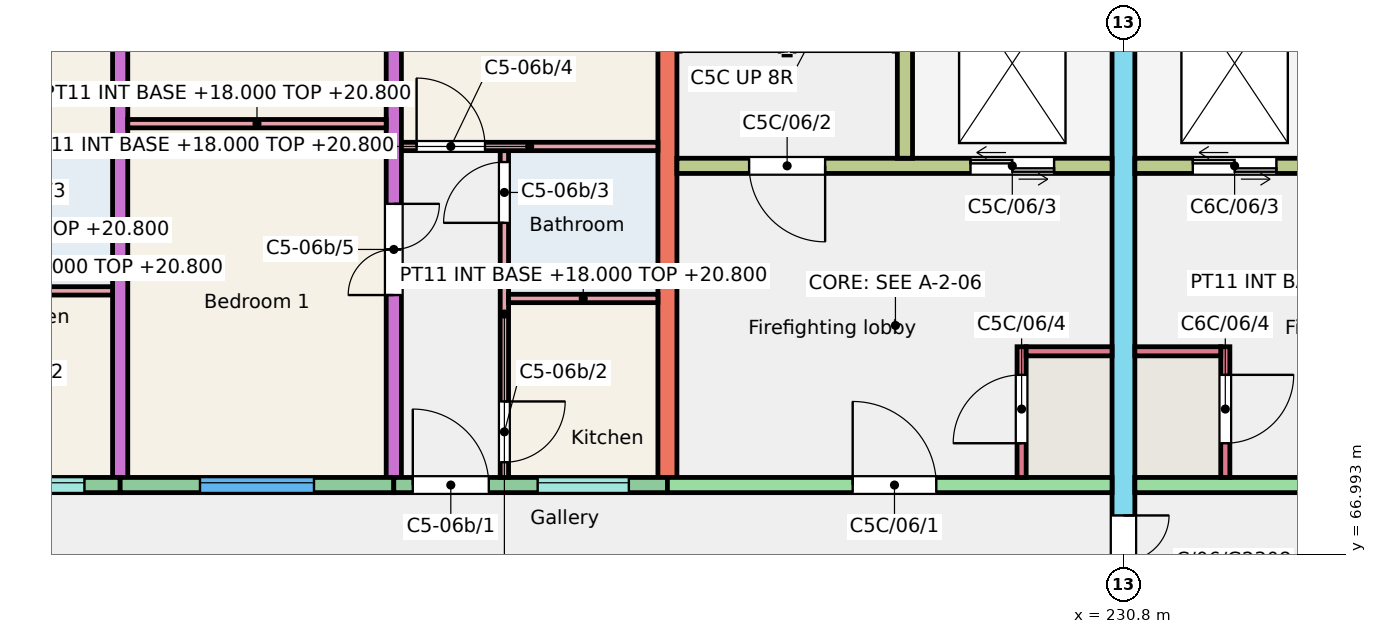
"""IFC4 building model, lengths in metres.
Left out: names, types, materials, properties, quantities, classifications, styles, units other than length and angle.
Written with IfcOpenShell. Run it as: python <this file> out.ifc"""

import sys

from ifc_helpers import new_model, si_unit, direction, frame, frame_2d, origin, place, context, subcontext, project, spatial, rectangle, extrude, element, fill, save


model = new_model("IFC4")
c1 = context("Model", 3, precision=1e-05, world=origin(), true_north=direction((0.0, 1.0)))
c2 = subcontext(c1, "Body", "Model", "MODEL_VIEW")
j1 = project(units=[si_unit("LENGTHUNIT", "METRE"), si_unit("PLANEANGLEUNIT", "RADIAN")], contexts=[c1])
p1 = place(None, origin())
s1 = spatial("IfcSite", under=j1, at=p1, CompositionType="ELEMENT")
p2 = place(p1, origin())
s2 = spatial("IfcBuilding", under=s1, at=p2, CompositionType="ELEMENT")
p3 = place(p2, frame((0.0, 0.0, 18.0)))
s3 = spatial("IfcBuildingStorey", under=s2, at=p3, CompositionType="ELEMENT", Elevation=18.0)
p4 = place(p3, frame((217.6, 68.0, 0.0), z_axis=(0.0, 0.0, 1.0), x_axis=(0.0, 1.0, 0.0)))
e1 = element("IfcWall", 1, at=p4, inside=s3, PredefinedType="SHEAR", context=c2, shape_type="SweptSolid", body=[
    extrude(rectangle(XDim=9.0, YDim=0.2, at=frame_2d((4.5, 0.0))), origin(), (0.0, 0.0, 1.0), 3.0),
])
p5 = place(p3, frame((221.2, 68.0, 0.0), z_axis=(0.0, 0.0, 1.0), x_axis=(0.0, 1.0, 0.0)))
e2 = element("IfcWall", 2, at=p5, inside=s3, PredefinedType="SHEAR", context=c2, shape_type="SweptSolid", body=[
    extrude(rectangle(XDim=9.0, YDim=0.2, at=frame_2d((4.5, 0.0))), origin(), (0.0, 0.0, 1.0), 3.0),
])
p6 = place(p5, frame((2.4, 0.0, 0.0)))
e3 = element("IfcOpeningElement", 3, at=p6, cuts=e2, PredefinedType="OPENING", context=c2, shape_type="SweptSolid", body=[
    extrude(rectangle(XDim=1.2, YDim=2.1, at=frame_2d((0.6, 1.05))), frame((0.0, 0.11, 0.0), z_axis=(0.0, -1.0, 0.0), x_axis=(1.0, 0.0, 0.0)), (0.0, 0.0, 1.0), 0.22),
])
p7 = place(p5, frame((6.4, 0.0, 0.0)))
e4 = element("IfcOpeningElement", 4, at=p7, cuts=e2, PredefinedType="OPENING", context=c2, shape_type="SweptSolid", body=[
    extrude(rectangle(XDim=1.2, YDim=2.1, at=frame_2d((0.6, 1.05))), frame((0.0, 0.11, 0.0), z_axis=(0.0, -1.0, 0.0), x_axis=(1.0, 0.0, 0.0)), (0.0, 0.0, 1.0), 0.22),
])
p8 = place(p3, frame((224.8, 68.0, 0.0), z_axis=(0.0, 0.0, 1.0), x_axis=(0.0, 1.0, 0.0)))
e5 = element("IfcWall", 5, at=p8, inside=s3, PredefinedType="SHEAR", context=c2, shape_type="SweptSolid", body=[
    extrude(rectangle(XDim=9.0, YDim=0.25, at=frame_2d((4.5, 0.0))), origin(), (0.0, 0.0, 1.0), 3.0),
])
p9 = place(p3, frame((230.8, 66.0, 0.0), z_axis=(0.0, 0.0, 1.0), x_axis=(0.0, 1.0, 0.0)))
e6 = element("IfcWall", 6, at=p9, inside=s3, PredefinedType="SHEAR", context=c2, shape_type="SweptSolid", body=[
    extrude(rectangle(XDim=11.0, YDim=0.3, at=frame_2d((5.5, 0.0))), origin(), (0.0, 0.0, 1.0), 3.0),
])
p10 = place(p9, frame((0.3, 0.0, 0.0)))
e7 = element("IfcOpeningElement", 7, at=p10, cuts=e6, PredefinedType="OPENING", context=c2, shape_type="SweptSolid", body=[
    extrude(rectangle(XDim=1.2, YDim=2.1, at=frame_2d((0.6, 1.05))), frame((0.0, 0.16, 0.0), z_axis=(0.0, -1.0, 0.0), x_axis=(1.0, 0.0, 0.0)), (0.0, 0.0, 1.0), 0.32),
])
p11 = place(p3, frame((214.15, 67.9, 0.0), z_axis=(0.0, 0.0, 1.0), x_axis=(1.0, 0.0, 0.0)))
e8 = element("IfcWall", 8, at=p11, inside=s3, PredefinedType="SOLIDWALL", context=c2, shape_type="SweptSolid", body=[
    extrude(rectangle(XDim=3.45, YDim=0.2, at=frame_2d((1.725, 0.0))), origin(), (0.0, 0.0, 1.0), 3.0),
])
p12 = place(p11, frame((1.78, 0.0, 1.1)))
e9 = element("IfcOpeningElement", 9, at=p12, cuts=e8, PredefinedType="OPENING", context=c2, shape_type="SweptSolid", body=[
    extrude(rectangle(XDim=1.2, YDim=1.3, at=frame_2d((0.6, 0.65))), frame((0.0, 0.11, 0.0), z_axis=(0.0, -1.0, 0.0), x_axis=(1.0, 0.0, 0.0)), (0.0, 0.0, 1.0), 0.22),
])
p13 = place(p11, frame((0.15, 0.0, 0.0)))
e10 = element("IfcOpeningElement", 10, at=p13, cuts=e8, PredefinedType="OPENING", context=c2, shape_type="SweptSolid", body=[
    extrude(rectangle(XDim=1.0, YDim=2.1, at=frame_2d((0.5, 1.05))), frame((0.0, 0.11, 0.0), z_axis=(0.0, -1.0, 0.0), x_axis=(1.0, 0.0, 0.0)), (0.0, 0.0, 1.0), 0.22),
])
p14 = place(p3, frame((217.6, 67.9, 0.0), z_axis=(0.0, 0.0, 1.0), x_axis=(1.0, 0.0, 0.0)))
e11 = element("IfcWall", 11, at=p14, inside=s3, PredefinedType="SOLIDWALL", context=c2, shape_type="SweptSolid", body=[
    extrude(rectangle(XDim=3.6, YDim=0.2, at=frame_2d((1.8, 0.0))), origin(), (0.0, 0.0, 1.0), 3.0),
])
p15 = place(p14, frame((1.05, 0.0, 0.9)))
e12 = element("IfcOpeningElement", 12, at=p15, cuts=e11, PredefinedType="OPENING", context=c2, shape_type="SweptSolid", body=[
    extrude(rectangle(XDim=1.5, YDim=1.5, at=frame_2d((0.75, 0.75))), frame((0.0, 0.11, 0.0), z_axis=(0.0, -1.0, 0.0), x_axis=(1.0, 0.0, 0.0)), (0.0, 0.0, 1.0), 0.22),
])
p16 = place(p3, frame((221.2, 67.9, 0.0), z_axis=(0.0, 0.0, 1.0), x_axis=(1.0, 0.0, 0.0)))
e13 = element("IfcWall", 13, at=p16, inside=s3, PredefinedType="SOLIDWALL", context=c2, shape_type="SweptSolid", body=[
    extrude(rectangle(XDim=3.6, YDim=0.2, at=frame_2d((1.8, 0.0))), origin(), (0.0, 0.0, 1.0), 3.0),
])
p17 = place(p16, frame((1.893, 0.0, 1.1)))
e14 = element("IfcOpeningElement", 14, at=p17, cuts=e13, PredefinedType="OPENING", context=c2, shape_type="SweptSolid", body=[
    extrude(rectangle(XDim=1.2, YDim=1.3, at=frame_2d((0.6, 0.65))), frame((0.0, 0.11, 0.0), z_axis=(0.0, -1.0, 0.0), x_axis=(1.0, 0.0, 0.0)), (0.0, 0.0, 1.0), 0.22),
])
p18 = place(p16, frame((0.25, 0.0, 0.0)))
e15 = element("IfcOpeningElement", 15, at=p18, cuts=e13, PredefinedType="OPENING", context=c2, shape_type="SweptSolid", body=[
    extrude(rectangle(XDim=1.0, YDim=2.1, at=frame_2d((0.5, 1.05))), frame((0.0, 0.11, 0.0), z_axis=(0.0, -1.0, 0.0), x_axis=(1.0, 0.0, 0.0)), (0.0, 0.0, 1.0), 0.22),
])
p19 = place(p3, frame((224.8, 67.9, 0.0), z_axis=(0.0, 0.0, 1.0), x_axis=(1.0, 0.0, 0.0)))
e16 = element("IfcWall", 16, at=p19, inside=s3, PredefinedType="SHEAR", context=c2, shape_type="SweptSolid", body=[
    extrude(rectangle(XDim=5.85, YDim=0.2, at=frame_2d((2.925, 0.0))), origin(), (0.0, 0.0, 1.0), 3.0),
])
p20 = place(p19, frame((2.438, 0.0, 0.0)))
e17 = element("IfcOpeningElement", 17, at=p20, cuts=e16, PredefinedType="OPENING", context=c2, shape_type="SweptSolid", body=[
    extrude(rectangle(XDim=1.1, YDim=2.1, at=frame_2d((0.55, 1.05))), frame((0.0, 0.11, 0.0), z_axis=(0.0, -1.0, 0.0), x_axis=(1.0, 0.0, 0.0)), (0.0, 0.0, 1.0), 0.22),
])
p21 = place(p3, frame((224.925, 72.1, 0.0), z_axis=(0.0, 0.0, 1.0), x_axis=(1.0, 0.0, 0.0)))
e18 = element("IfcWall", 18, at=p21, inside=s3, PredefinedType="SHEAR", context=c2, shape_type="SweptSolid", body=[
    extrude(rectangle(XDim=5.725, YDim=0.2, at=frame_2d((2.862, 0.0))), origin(), (0.0, 0.0, 1.0), 3.0),
])
p22 = place(p21, frame((0.95, 0.0, 0.0)))
e19 = element("IfcOpeningElement", 19, at=p22, cuts=e18, PredefinedType="OPENING", context=c2, shape_type="SweptSolid", body=[
    extrude(rectangle(XDim=1.0, YDim=2.1, at=frame_2d((0.5, 1.05))), frame((0.0, 0.11, 0.0), z_axis=(0.0, -1.0, 0.0), x_axis=(1.0, 0.0, 0.0)), (0.0, 0.0, 1.0), 0.22),
])
p23 = place(p21, frame((3.863, 0.0, 0.0)))
e20 = element("IfcOpeningElement", 20, at=p23, cuts=e18, PredefinedType="OPENING", context=c2, shape_type="SweptSolid", body=[
    extrude(rectangle(XDim=1.1, YDim=2.1, at=frame_2d((0.55, 1.05))), frame((0.0, 0.11, 0.0), z_axis=(0.0, -1.0, 0.0), x_axis=(1.0, 0.0, 0.0)), (0.0, 0.0, 1.0), 0.22),
])
p24 = place(p3, frame((227.925, 72.2, 0.0), z_axis=(0.0, 0.0, 1.0), x_axis=(0.0, 1.0, 0.0)))
e21 = element("IfcWall", 21, at=p24, inside=s3, PredefinedType="SHEAR", context=c2, shape_type="SweptSolid", body=[
    extrude(rectangle(XDim=4.8, YDim=0.2, at=frame_2d((2.4, 0.0))), origin(), (0.0, 0.0, 1.0), 3.0),
])
p25 = place(p3, frame((229.46, 68.0, 0.0), z_axis=(0.0, 0.0, 1.0), x_axis=(0.0, 1.0, 0.0)))
e22 = element("IfcWall", 22, at=p25, inside=s3, PredefinedType="SHEAR", context=c2, shape_type="SweptSolid", body=[
    extrude(rectangle(XDim=1.72, YDim=0.12, at=frame_2d((0.86, 0.0))), origin(), (0.0, 0.0, 1.0), 3.0),
])
p26 = place(p25, frame((0.45, 0.0, 0.0)))
e23 = element("IfcOpeningElement", 23, at=p26, cuts=e22, PredefinedType="OPENING", context=c2, shape_type="SweptSolid", body=[
    extrude(rectangle(XDim=0.9, YDim=2.1, at=frame_2d((0.45, 1.05))), frame((0.0, 0.07, 0.0), z_axis=(0.0, -1.0, 0.0), x_axis=(1.0, 0.0, 0.0)), (0.0, 0.0, 1.0), 0.14),
])
p27 = place(p3, frame((229.52, 69.66, 0.0), z_axis=(0.0, 0.0, 1.0), x_axis=(1.0, 0.0, 0.0)))
e24 = element("IfcWall", 24, at=p27, inside=s3, PredefinedType="SHEAR", context=c2, shape_type="SweptSolid", body=[
    extrude(rectangle(XDim=1.13, YDim=0.12, at=frame_2d((0.565, 0.0))), origin(), (0.0, 0.0, 1.0), 3.0),
])
p28 = place(p3, frame((230.95, 67.9, 0.0), z_axis=(0.0, 0.0, 1.0), x_axis=(1.0, 0.0, 0.0)))
e25 = element("IfcWall", 25, at=p28, inside=s3, PredefinedType="SHEAR", context=c2, shape_type="SweptSolid", body=[
    extrude(rectangle(XDim=5.85, YDim=0.2, at=frame_2d((2.925, 0.0))), origin(), (0.0, 0.0, 1.0), 3.0),
])
p29 = place(p28, frame((2.312, 0.0, 0.0)))
e26 = element("IfcOpeningElement", 26, at=p29, cuts=e25, PredefinedType="OPENING", context=c2, shape_type="SweptSolid", body=[
    extrude(rectangle(XDim=1.1, YDim=2.1, at=frame_2d((0.55, 1.05))), frame((0.0, 0.11, 0.0), z_axis=(0.0, -1.0, 0.0), x_axis=(1.0, 0.0, 0.0)), (0.0, 0.0, 1.0), 0.22),
])
p30 = place(p3, frame((230.95, 72.1, 0.0), z_axis=(0.0, 0.0, 1.0), x_axis=(1.0, 0.0, 0.0)))
e27 = element("IfcWall", 27, at=p30, inside=s3, PredefinedType="SHEAR", context=c2, shape_type="SweptSolid", body=[
    extrude(rectangle(XDim=5.725, YDim=0.2, at=frame_2d((2.863, 0.0))), origin(), (0.0, 0.0, 1.0), 3.0),
])
p31 = place(p30, frame((3.775, 0.0, 0.0)))
e28 = element("IfcOpeningElement", 28, at=p31, cuts=e27, PredefinedType="OPENING", context=c2, shape_type="SweptSolid", body=[
    extrude(rectangle(XDim=1.0, YDim=2.1, at=frame_2d((0.5, 1.05))), frame((0.0, 0.11, 0.0), z_axis=(0.0, -1.0, 0.0), x_axis=(1.0, 0.0, 0.0)), (0.0, 0.0, 1.0), 0.22),
])
p32 = place(p30, frame((0.762, 0.0, 0.0)))
e29 = element("IfcOpeningElement", 29, at=p32, cuts=e27, PredefinedType="OPENING", context=c2, shape_type="SweptSolid", body=[
    extrude(rectangle(XDim=1.1, YDim=2.1, at=frame_2d((0.55, 1.05))), frame((0.0, 0.11, 0.0), z_axis=(0.0, -1.0, 0.0), x_axis=(1.0, 0.0, 0.0)), (0.0, 0.0, 1.0), 0.22),
])
p33 = place(p3, frame((232.14, 68.0, 0.0), z_axis=(0.0, 0.0, 1.0), x_axis=(0.0, 1.0, 0.0)))
e30 = element("IfcWall", 30, at=p33, inside=s3, PredefinedType="SHEAR", context=c2, shape_type="SweptSolid", body=[
    extrude(rectangle(XDim=1.72, YDim=0.12, at=frame_2d((0.86, 0.0))), origin(), (0.0, 0.0, 1.0), 3.0),
])
p34 = place(p33, frame((0.45, 0.0, 0.0)))
e31 = element("IfcOpeningElement", 31, at=p34, cuts=e30, PredefinedType="OPENING", context=c2, shape_type="SweptSolid", body=[
    extrude(rectangle(XDim=0.9, YDim=2.1, at=frame_2d((0.45, 1.05))), frame((0.0, 0.07, 0.0), z_axis=(0.0, -1.0, 0.0), x_axis=(1.0, 0.0, 0.0)), (0.0, 0.0, 1.0), 0.14),
])
p35 = place(p3, frame((230.95, 69.66, 0.0), z_axis=(0.0, 0.0, 1.0), x_axis=(1.0, 0.0, 0.0)))
e32 = element("IfcWall", 32, at=p35, inside=s3, PredefinedType="SHEAR", context=c2, shape_type="SweptSolid", body=[
    extrude(rectangle(XDim=1.13, YDim=0.12, at=frame_2d((0.565, 0.0))), origin(), (0.0, 0.0, 1.0), 3.0),
])
p36 = place(p3, frame((215.56, 70.455, 0.0), z_axis=(0.0, 0.0, 1.0), x_axis=(1.0, 0.0, 0.0)))
e33 = element("IfcWall", 33, at=p36, inside=s3, PredefinedType="PARTITIONING", context=c2, shape_type="SweptSolid", body=[
    extrude(rectangle(XDim=1.94, YDim=0.11, at=frame_2d((0.97, 0.0))), origin(), (0.0, 0.0, 1.0), 2.8),
])
p37 = place(p3, frame((214.15, 72.355, 0.0), z_axis=(0.0, 0.0, 1.0), x_axis=(1.0, 0.0, 0.0)))
e34 = element("IfcWall", 34, at=p37, inside=s3, PredefinedType="PARTITIONING", context=c2, shape_type="SweptSolid", body=[
    extrude(rectangle(XDim=3.35, YDim=0.11, at=frame_2d((1.675, 0.0))), origin(), (0.0, 0.0, 1.0), 2.8),
])
p38 = place(p37, frame((0.2, 0.0, 0.0)))
e35 = element("IfcOpeningElement", 35, at=p38, cuts=e34, PredefinedType="OPENING", context=c2, shape_type="SweptSolid", body=[
    extrude(rectangle(XDim=0.9, YDim=2.1, at=frame_2d((0.45, 1.05))), frame((0.0, 0.065, 0.0), z_axis=(0.0, -1.0, 0.0), x_axis=(1.0, 0.0, 0.0)), (0.0, 0.0, 1.0), 0.13),
])
p39 = place(p3, frame((222.655, 68.0, 0.0), z_axis=(0.0, 0.0, 1.0), x_axis=(0.0, 1.0, 0.0)))
e36 = element("IfcWall", 36, at=p39, inside=s3, PredefinedType="PARTITIONING", context=c2, shape_type="SweptSolid", body=[
    extrude(rectangle(XDim=4.3, YDim=0.11, at=frame_2d((2.15, 0.0))), origin(), (0.0, 0.0, 1.0), 2.8),
])
p40 = place(p39, frame((0.2, 0.0, 0.0)))
e37 = element("IfcOpeningElement", 37, at=p40, cuts=e36, PredefinedType="OPENING", context=c2, shape_type="SweptSolid", body=[
    extrude(rectangle(XDim=0.8, YDim=2.1, at=frame_2d((0.4, 1.05))), frame((0.0, 0.065, 0.0), z_axis=(0.0, -1.0, 0.0), x_axis=(1.0, 0.0, 0.0)), (0.0, 0.0, 1.0), 0.13),
])
p41 = place(p39, frame((3.35, 0.0, 0.0)))
e38 = element("IfcOpeningElement", 38, at=p41, cuts=e36, PredefinedType="OPENING", context=c2, shape_type="SweptSolid", body=[
    extrude(rectangle(XDim=0.8, YDim=2.1, at=frame_2d((0.4, 1.05))), frame((0.0, 0.065, 0.0), z_axis=(0.0, -1.0, 0.0), x_axis=(1.0, 0.0, 0.0)), (0.0, 0.0, 1.0), 0.13),
])
p42 = place(p3, frame((222.71, 70.355, 0.0), z_axis=(0.0, 0.0, 1.0), x_axis=(1.0, 0.0, 0.0)))
e39 = element("IfcWall", 39, at=p42, inside=s3, PredefinedType="PARTITIONING", context=c2, shape_type="SweptSolid", body=[
    extrude(rectangle(XDim=1.965, YDim=0.11, at=frame_2d((0.982, 0.0))), origin(), (0.0, 0.0, 1.0), 2.8),
])
p43 = place(p3, frame((221.3, 72.355, 0.0), z_axis=(0.0, 0.0, 1.0), x_axis=(1.0, 0.0, 0.0)))
e40 = element("IfcWall", 40, at=p43, inside=s3, PredefinedType="PARTITIONING", context=c2, shape_type="SweptSolid", body=[
    extrude(rectangle(XDim=3.375, YDim=0.11, at=frame_2d((1.688, 0.0))), origin(), (0.0, 0.0, 1.0), 2.8),
])
p44 = place(p43, frame((0.2, 0.0, 0.0)))
e41 = element("IfcOpeningElement", 41, at=p44, cuts=e40, PredefinedType="OPENING", context=c2, shape_type="SweptSolid", body=[
    extrude(rectangle(XDim=0.9, YDim=2.1, at=frame_2d((0.45, 1.05))), frame((0.0, 0.065, 0.0), z_axis=(0.0, -1.0, 0.0), x_axis=(1.0, 0.0, 0.0)), (0.0, 0.0, 1.0), 0.13),
])
p45 = place(p3, frame((217.7, 72.655, 0.0), z_axis=(0.0, 0.0, 1.0), x_axis=(1.0, 0.0, 0.0)))
e42 = element("IfcWall", 42, at=p45, inside=s3, PredefinedType="PARTITIONING", context=c2, shape_type="SweptSolid", body=[
    extrude(rectangle(XDim=3.4, YDim=0.11, at=frame_2d((1.7, 0.0))), origin(), (0.0, 0.0, 1.0), 2.8),
])
p46 = place(p12, origin())
e43 = element("IfcWindow", 43, at=p46, inside=s3, PartitioningType="SINGLE_PANEL", PredefinedType="WINDOW", context=c2, shape_type="SweptSolid", body=[
    extrude(rectangle(XDim=1.2, YDim=1.3, at=frame_2d((0.6, 0.65))), frame((0.0, 0.06, 0.0), z_axis=(0.0, -1.0, 0.0), x_axis=(1.0, 0.0, 0.0)), (0.0, 0.0, 1.0), 0.06),
])
fill(e9, e43)
p47 = place(p15, origin())
e44 = element("IfcWindow", 44, at=p47, inside=s3, PartitioningType="SINGLE_PANEL", PredefinedType="WINDOW", context=c2, shape_type="SweptSolid", body=[
    extrude(rectangle(XDim=1.5, YDim=1.5, at=frame_2d((0.75, 0.75))), frame((0.0, 0.06, 0.0), z_axis=(0.0, -1.0, 0.0), x_axis=(1.0, 0.0, 0.0)), (0.0, 0.0, 1.0), 0.06),
])
fill(e12, e44)
p48 = place(p17, origin())
e45 = element("IfcWindow", 45, at=p48, inside=s3, PartitioningType="SINGLE_PANEL", PredefinedType="WINDOW", context=c2, shape_type="SweptSolid", body=[
    extrude(rectangle(XDim=1.2, YDim=1.3, at=frame_2d((0.6, 0.65))), frame((0.0, 0.06, 0.0), z_axis=(0.0, -1.0, 0.0), x_axis=(1.0, 0.0, 0.0)), (0.0, 0.0, 1.0), 0.06),
])
fill(e14, e45)
p49 = place(p18, origin())
e46 = element("IfcDoor", 46, at=p49, inside=s3, OperationType="SINGLE_SWING_LEFT", PredefinedType="DOOR", context=c2, shape_type="SweptSolid", body=[
    extrude(rectangle(XDim=1.0, YDim=2.1, at=frame_2d((0.5, 1.05))), frame((0.0, 0.025, 0.0), z_axis=(0.0, -1.0, 0.0), x_axis=(1.0, 0.0, 0.0)), (0.0, 0.0, 1.0), 0.05),
])
fill(e15, e46)
p50 = place(p40, origin())
e47 = element("IfcDoor", 47, at=p50, inside=s3, OperationType="SINGLE_SWING_RIGHT", PredefinedType="DOOR", context=c2, shape_type="SweptSolid", body=[
    extrude(rectangle(XDim=0.8, YDim=2.1, at=frame_2d((0.4, 1.05))), frame((0.0, 0.025, 0.0), z_axis=(0.0, -1.0, 0.0), x_axis=(1.0, 0.0, 0.0)), (0.0, 0.0, 1.0), 0.05),
])
fill(e37, e47)
p51 = place(p41, origin())
e48 = element("IfcDoor", 48, at=p51, inside=s3, OperationType="SINGLE_SWING_LEFT", PredefinedType="DOOR", context=c2, shape_type="SweptSolid", body=[
    extrude(rectangle(XDim=0.8, YDim=2.1, at=frame_2d((0.4, 1.05))), frame((0.0, 0.025, 0.0), z_axis=(0.0, -1.0, 0.0), x_axis=(1.0, 0.0, 0.0)), (0.0, 0.0, 1.0), 0.05),
])
fill(e38, e48)
p52 = place(p44, origin())
e49 = element("IfcDoor", 49, at=p52, inside=s3, OperationType="SINGLE_SWING_LEFT", PredefinedType="DOOR", context=c2, shape_type="SweptSolid", body=[
    extrude(rectangle(XDim=0.9, YDim=2.1, at=frame_2d((0.45, 1.05))), frame((0.0, 0.025, 0.0), z_axis=(0.0, -1.0, 0.0), x_axis=(1.0, 0.0, 0.0)), (0.0, 0.0, 1.0), 0.05),
])
fill(e41, e49)
p53 = place(p6, origin())
e50 = element("IfcDoor", 50, at=p53, inside=s3, OperationType="DOUBLE_DOOR_SINGLE_SWING", PredefinedType="DOOR", context=c2, shape_type="SweptSolid", body=[
    extrude(rectangle(XDim=1.2, YDim=2.1, at=frame_2d((0.6, 1.05))), frame((0.0, 0.025, 0.0), z_axis=(0.0, -1.0, 0.0), x_axis=(1.0, 0.0, 0.0)), (0.0, 0.0, 1.0), 0.05),
])
fill(e3, e50)
p54 = place(p20, origin())
e51 = element("IfcDoor", 51, at=p54, inside=s3, OperationType="SINGLE_SWING_LEFT", PredefinedType="DOOR", context=c2, shape_type="SweptSolid", body=[
    extrude(rectangle(XDim=1.1, YDim=2.1, at=frame_2d((0.55, 1.05))), frame((0.0, 0.025, 0.0), z_axis=(0.0, -1.0, 0.0), x_axis=(1.0, 0.0, 0.0)), (0.0, 0.0, 1.0), 0.05),
])
fill(e17, e51)
p55 = place(p22, origin())
e52 = element("IfcDoor", 52, at=p55, inside=s3, OperationType="SINGLE_SWING_RIGHT", PredefinedType="DOOR", context=c2, shape_type="SweptSolid", body=[
    extrude(rectangle(XDim=1.0, YDim=2.1, at=frame_2d((0.5, 1.05))), frame((0.0, 0.025, 0.0), z_axis=(0.0, -1.0, 0.0), x_axis=(1.0, 0.0, 0.0)), (0.0, 0.0, 1.0), 0.05),
])
fill(e19, e52)
p56 = place(p23, origin())
e53 = element("IfcDoor", 53, at=p56, inside=s3, OperationType="DOUBLE_DOOR_SLIDING", PredefinedType="DOOR", context=c2, shape_type="SweptSolid", body=[
    extrude(rectangle(XDim=1.1, YDim=2.1, at=frame_2d((0.55, 1.05))), frame((0.0, 0.025, 0.0), z_axis=(0.0, -1.0, 0.0), x_axis=(1.0, 0.0, 0.0)), (0.0, 0.0, 1.0), 0.05),
])
fill(e20, e53)
p57 = place(p26, origin())
e54 = element("IfcDoor", 54, at=p57, inside=s3, OperationType="SINGLE_SWING_LEFT", PredefinedType="DOOR", context=c2, shape_type="SweptSolid", body=[
    extrude(rectangle(XDim=0.9, YDim=2.1, at=frame_2d((0.45, 1.05))), frame((0.0, 0.025, 0.0), z_axis=(0.0, -1.0, 0.0), x_axis=(1.0, 0.0, 0.0)), (0.0, 0.0, 1.0), 0.05),
])
fill(e23, e54)
p58 = place(p32, origin())
e55 = element("IfcDoor", 55, at=p58, inside=s3, OperationType="DOUBLE_DOOR_SLIDING", PredefinedType="DOOR", context=c2, shape_type="SweptSolid", body=[
    extrude(rectangle(XDim=1.1, YDim=2.1, at=frame_2d((0.55, 1.05))), frame((0.0, 0.025, 0.0), z_axis=(0.0, -1.0, 0.0), x_axis=(1.0, 0.0, 0.0)), (0.0, 0.0, 1.0), 0.05),
])
fill(e29, e55)
p59 = place(p34, origin())
e56 = element("IfcDoor", 56, at=p59, inside=s3, OperationType="SINGLE_SWING_RIGHT", PredefinedType="DOOR", context=c2, shape_type="SweptSolid", body=[
    extrude(rectangle(XDim=0.9, YDim=2.1, at=frame_2d((0.45, 1.05))), frame((0.0, 0.025, 0.0), z_axis=(0.0, -1.0, 0.0), x_axis=(1.0, 0.0, 0.0)), (0.0, 0.0, 1.0), 0.05),
])
fill(e31, e56)
p60 = place(p10, origin())
e57 = element("IfcDoor", 57, at=p60, inside=s3, OperationType="DOUBLE_DOOR_SINGLE_SWING", PredefinedType="DOOR", context=c2, shape_type="SweptSolid", body=[
    extrude(rectangle(XDim=1.2, YDim=2.1, at=frame_2d((0.6, 1.05))), frame((0.0, 0.025, 0.0), z_axis=(0.0, -1.0, 0.0), x_axis=(1.0, 0.0, 0.0)), (0.0, 0.0, 1.0), 0.05),
])
fill(e7, e57)
save(model, sys.argv[1])
